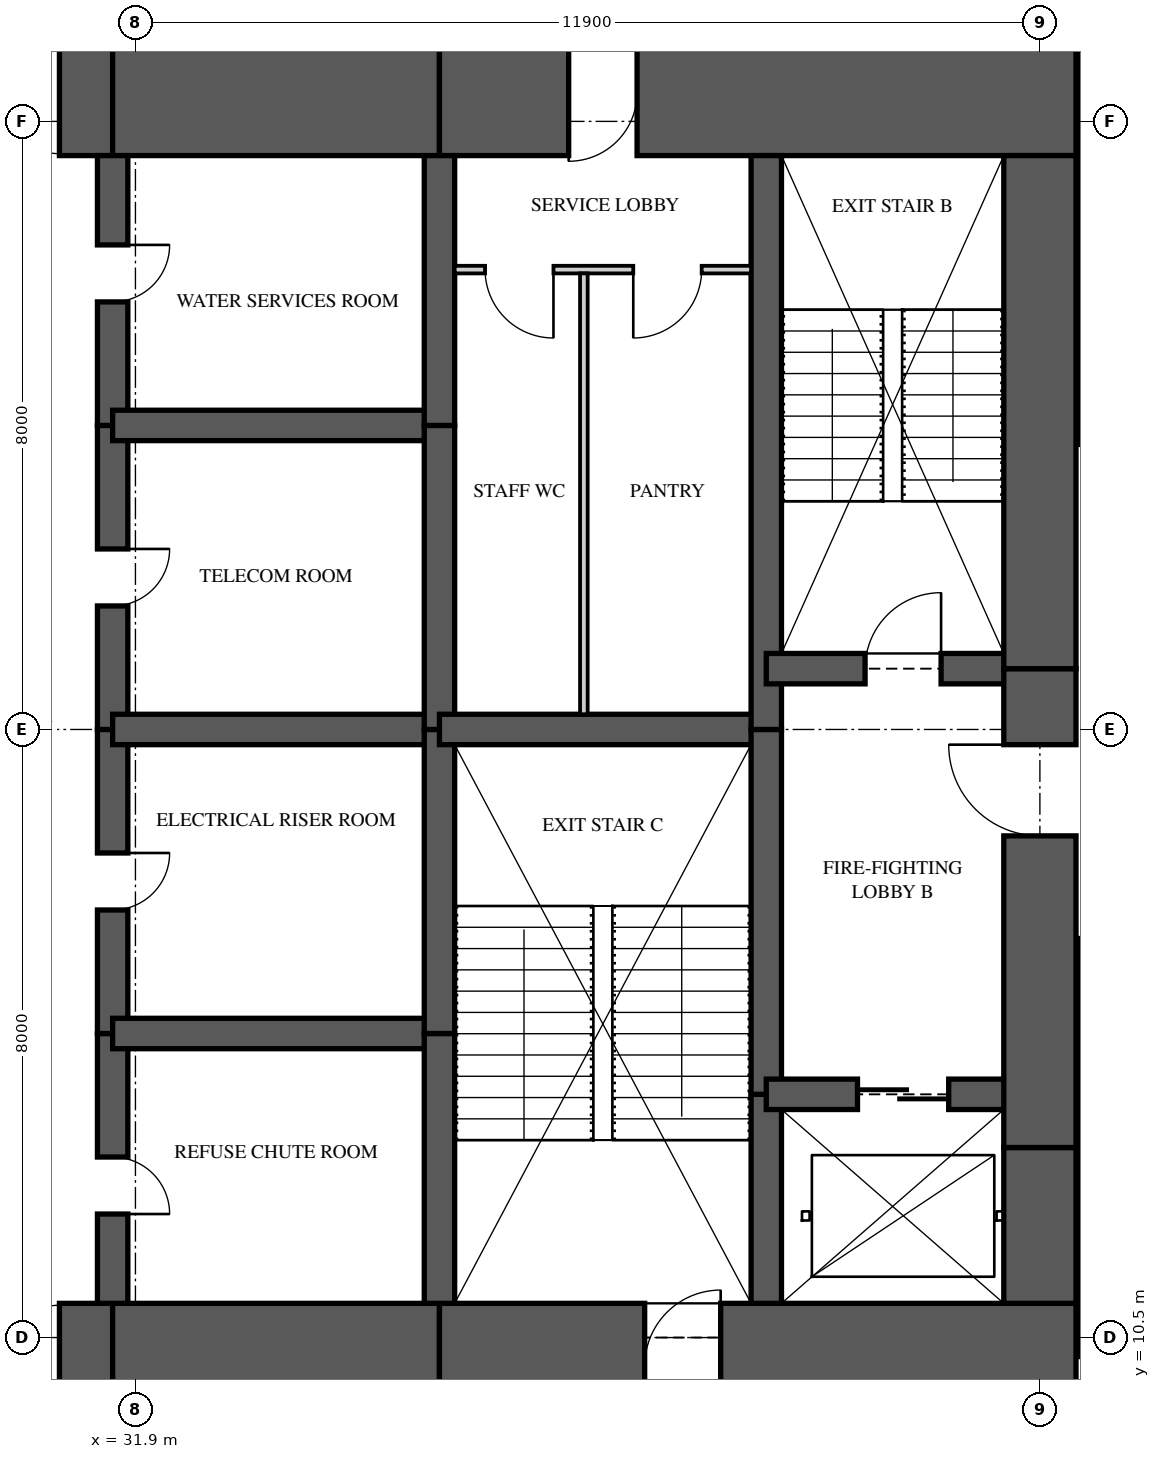
"""IFC4 building model, lengths in metres.
Left out: names, types, materials, properties, quantities, classifications, styles, units other than length and angle.
Written with IfcOpenShell. Run it as: python <this file> out.ifc"""

import sys

from ifc_helpers import new_model, si_unit, direction, frame, frame_2d, origin, place, context, subcontext, project, spatial, rectangle, extrude, element, fill, save


model = new_model("IFC4")
c1 = context("Model", 3, precision=1e-05, world=origin(), true_north=direction((0.0, 1.0)))
c2 = subcontext(c1, "Body", "Model", "MODEL_VIEW")
j1 = project(units=[si_unit("LENGTHUNIT", "METRE"), si_unit("PLANEANGLEUNIT", "RADIAN")], contexts=[c1])
p1 = place(None, origin())
s1 = spatial("IfcSite", under=j1, at=p1, CompositionType="ELEMENT")
p2 = place(p1, origin())
s2 = spatial("IfcBuilding", under=s1, at=p2, CompositionType="ELEMENT")
p3 = place(p2, frame((0.0, 0.0, 64.55)))
s3 = spatial("IfcBuildingStorey", under=s2, at=p3, CompositionType="ELEMENT", Elevation=64.55)
p4 = place(p3, frame((26.0, 10.125, 0.0), z_axis=(0.0, 0.0, 1.0), x_axis=(1.0, 0.0, 0.0)))
e1 = element("IfcWall", 1, at=p4, inside=s3, PredefinedType="SHEAR", context=c2, shape_type="SweptSolid", body=[
    extrude(rectangle(XDim=5.6, YDim=1.65, at=frame_2d((2.8, 0.0))), origin(), (0.0, 0.0, 1.0), 3.35),
])
p5 = place(p4, frame((3.3, 0.0, 0.0)))
e2 = element("IfcOpeningElement", 2, at=p5, cuts=e1, PredefinedType="OPENING", context=c2, shape_type="SweptSolid", body=[
    extrude(rectangle(XDim=1.6, YDim=2.1, at=frame_2d((0.8, 1.05))), frame((0.0, 0.835, 0.0), z_axis=(0.0, -1.0, 0.0), x_axis=(1.0, 0.0, 0.0)), (0.0, 0.0, 1.0), 1.67),
])
p6 = place(p3, frame((31.6, 10.125, 0.0), z_axis=(0.0, 0.0, 1.0), x_axis=(1.0, 0.0, 0.0)))
e3 = element("IfcWall", 3, at=p6, inside=s3, PredefinedType="SHEAR", context=c2, shape_type="SweptSolid", body=[
    extrude(rectangle(XDim=4.3, YDim=1.65, at=frame_2d((2.15, 0.0))), origin(), (0.0, 0.0, 1.0), 3.35),
])
p7 = place(p3, frame((35.9, 10.125, 0.0), z_axis=(0.0, 0.0, 1.0), x_axis=(1.0, 0.0, 0.0)))
e4 = element("IfcWall", 4, at=p7, inside=s3, PredefinedType="SHEAR", context=c2, shape_type="SweptSolid", body=[
    extrude(rectangle(XDim=8.375, YDim=1.65, at=frame_2d((4.188, 0.0))), origin(), (0.0, 0.0, 1.0), 3.35),
])
p8 = place(p7, frame((2.7, 0.0, 0.0)))
e5 = element("IfcOpeningElement", 5, at=p8, cuts=e4, PredefinedType="OPENING", context=c2, shape_type="SweptSolid", body=[
    extrude(rectangle(XDim=1.0, YDim=2.1, at=frame_2d((0.5, 1.05))), frame((0.0, 0.835, 0.0), z_axis=(0.0, -1.0, 0.0), x_axis=(1.0, 0.0, 0.0)), (0.0, 0.0, 1.0), 1.67),
])
p9 = place(p3, frame((44.275, 26.875, 0.0), z_axis=(0.0, 0.0, 1.0), x_axis=(-1.0, 0.0, 0.0)))
e6 = element("IfcWall", 6, at=p9, inside=s3, PredefinedType="SHEAR", context=c2, shape_type="SweptSolid", body=[
    extrude(rectangle(XDim=8.375, YDim=1.65, at=frame_2d((4.188, 0.0))), origin(), (0.0, 0.0, 1.0), 3.35),
])
p10 = place(p9, frame((5.775, 0.0, 0.0)))
e7 = element("IfcOpeningElement", 7, at=p10, cuts=e6, PredefinedType="OPENING", context=c2, shape_type="SweptSolid", body=[
    extrude(rectangle(XDim=0.9, YDim=2.1, at=frame_2d((0.45, 1.05))), frame((0.0, 0.835, 0.0), z_axis=(0.0, -1.0, 0.0), x_axis=(1.0, 0.0, 0.0)), (0.0, 0.0, 1.0), 1.67),
])
p11 = place(p3, frame((35.9, 26.875, 0.0), z_axis=(0.0, 0.0, 1.0), x_axis=(-1.0, 0.0, 0.0)))
e8 = element("IfcWall", 8, at=p11, inside=s3, PredefinedType="SHEAR", context=c2, shape_type="SweptSolid", body=[
    extrude(rectangle(XDim=4.3, YDim=1.65, at=frame_2d((2.15, 0.0))), origin(), (0.0, 0.0, 1.0), 3.35),
])
p12 = place(p3, frame((31.6, 26.875, 0.0), z_axis=(0.0, 0.0, 1.0), x_axis=(-1.0, 0.0, 0.0)))
e9 = element("IfcWall", 9, at=p12, inside=s3, PredefinedType="SHEAR", context=c2, shape_type="SweptSolid", body=[
    extrude(rectangle(XDim=5.6, YDim=1.65, at=frame_2d((2.8, 0.0))), origin(), (0.0, 0.0, 1.0), 3.35),
])
p13 = place(p12, frame((0.7, 0.0, 0.0)))
e10 = element("IfcOpeningElement", 10, at=p13, cuts=e9, PredefinedType="OPENING", context=c2, shape_type="SweptSolid", body=[
    extrude(rectangle(XDim=1.6, YDim=2.1, at=frame_2d((0.8, 1.05))), frame((0.0, 0.835, 0.0), z_axis=(0.0, -1.0, 0.0), x_axis=(1.0, 0.0, 0.0)), (0.0, 0.0, 1.0), 1.67),
])
p14 = place(p3, frame((43.8, 10.95, 0.0), z_axis=(0.0, 0.0, 1.0), x_axis=(0.0, 1.0, 0.0)))
e11 = element("IfcWall", 11, at=p14, inside=s3, PredefinedType="SHEAR", context=c2, shape_type="SweptSolid", body=[
    extrude(rectangle(XDim=2.05, YDim=0.95, at=frame_2d((1.025, 0.0))), origin(), (0.0, 0.0, 1.0), 3.35),
])
p15 = place(p3, frame((43.8, 13.0, 0.0), z_axis=(0.0, 0.0, 1.0), x_axis=(0.0, 1.0, 0.0)))
e12 = element("IfcWall", 12, at=p15, inside=s3, PredefinedType="SHEAR", context=c2, shape_type="SweptSolid", body=[
    extrude(rectangle(XDim=6.3, YDim=0.95, at=frame_2d((3.15, 0.0))), origin(), (0.0, 0.0, 1.0), 3.35),
])
p16 = place(p15, frame((4.1, 0.0, 0.0)))
e13 = element("IfcOpeningElement", 13, at=p16, cuts=e12, PredefinedType="OPENING", context=c2, shape_type="SweptSolid", body=[
    extrude(rectangle(XDim=1.2, YDim=2.2, at=frame_2d((0.6, 1.1))), frame((0.0, 0.485, 0.0), z_axis=(0.0, -1.0, 0.0), x_axis=(1.0, 0.0, 0.0)), (0.0, 0.0, 1.0), 0.97),
])
p17 = place(p3, frame((43.8, 19.3, 0.0), z_axis=(0.0, 0.0, 1.0), x_axis=(0.0, 1.0, 0.0)))
e14 = element("IfcWall", 14, at=p17, inside=s3, PredefinedType="SHEAR", context=c2, shape_type="SweptSolid", body=[
    extrude(rectangle(XDim=6.75, YDim=0.95, at=frame_2d((3.375, 0.0))), origin(), (0.0, 0.0, 1.0), 3.35),
])
p18 = place(p3, frame((31.6, 10.95, 0.0), z_axis=(0.0, 0.0, 1.0), x_axis=(0.0, 1.0, 0.0)))
e15 = element("IfcWall", 15, at=p18, inside=s3, PredefinedType="SHEAR", context=c2, shape_type="SweptSolid", body=[
    extrude(rectangle(XDim=3.55, YDim=0.4, at=frame_2d((1.775, 0.0))), origin(), (0.0, 0.0, 1.0), 3.35),
])
p19 = place(p18, frame((1.175, 0.0, 0.0)))
e16 = element("IfcOpeningElement", 16, at=p19, cuts=e15, PredefinedType="OPENING", context=c2, shape_type="SweptSolid", body=[
    extrude(rectangle(XDim=0.75, YDim=2.1, at=frame_2d((0.375, 1.05))), frame((0.0, 0.21, 0.0), z_axis=(0.0, -1.0, 0.0), x_axis=(1.0, 0.0, 0.0)), (0.0, 0.0, 1.0), 0.42),
])
p20 = place(p3, frame((31.6, 14.5, 0.0), z_axis=(0.0, 0.0, 1.0), x_axis=(0.0, 1.0, 0.0)))
e17 = element("IfcWall", 17, at=p20, inside=s3, PredefinedType="SHEAR", context=c2, shape_type="SweptSolid", body=[
    extrude(rectangle(XDim=4.0, YDim=0.4, at=frame_2d((2.0, 0.0))), origin(), (0.0, 0.0, 1.0), 3.35),
])
p21 = place(p20, frame((1.625, 0.0, 0.0)))
e18 = element("IfcOpeningElement", 18, at=p21, cuts=e17, PredefinedType="OPENING", context=c2, shape_type="SweptSolid", body=[
    extrude(rectangle(XDim=0.75, YDim=2.1, at=frame_2d((0.375, 1.05))), frame((0.0, 0.21, 0.0), z_axis=(0.0, -1.0, 0.0), x_axis=(1.0, 0.0, 0.0)), (0.0, 0.0, 1.0), 0.42),
])
p22 = place(p3, frame((31.6, 18.5, 0.0), z_axis=(0.0, 0.0, 1.0), x_axis=(0.0, 1.0, 0.0)))
e19 = element("IfcWall", 19, at=p22, inside=s3, PredefinedType="SHEAR", context=c2, shape_type="SweptSolid", body=[
    extrude(rectangle(XDim=4.0, YDim=0.4, at=frame_2d((2.0, 0.0))), origin(), (0.0, 0.0, 1.0), 3.35),
])
p23 = place(p22, frame((1.625, 0.0, 0.0)))
e20 = element("IfcOpeningElement", 20, at=p23, cuts=e19, PredefinedType="OPENING", context=c2, shape_type="SweptSolid", body=[
    extrude(rectangle(XDim=0.75, YDim=2.1, at=frame_2d((0.375, 1.05))), frame((0.0, 0.21, 0.0), z_axis=(0.0, -1.0, 0.0), x_axis=(1.0, 0.0, 0.0)), (0.0, 0.0, 1.0), 0.42),
])
p24 = place(p3, frame((31.6, 22.5, 0.0), z_axis=(0.0, 0.0, 1.0), x_axis=(0.0, 1.0, 0.0)))
e21 = element("IfcWall", 21, at=p24, inside=s3, PredefinedType="SHEAR", context=c2, shape_type="SweptSolid", body=[
    extrude(rectangle(XDim=3.55, YDim=0.4, at=frame_2d((1.775, 0.0))), origin(), (0.0, 0.0, 1.0), 3.35),
])
p25 = place(p24, frame((1.625, 0.0, 0.0)))
e22 = element("IfcOpeningElement", 22, at=p25, cuts=e21, PredefinedType="OPENING", context=c2, shape_type="SweptSolid", body=[
    extrude(rectangle(XDim=0.75, YDim=2.1, at=frame_2d((0.375, 1.05))), frame((0.0, 0.21, 0.0), z_axis=(0.0, -1.0, 0.0), x_axis=(1.0, 0.0, 0.0)), (0.0, 0.0, 1.0), 0.42),
])
p26 = place(p3, frame((35.9, 10.95, 0.0), z_axis=(0.0, 0.0, 1.0), x_axis=(0.0, 1.0, 0.0)))
e23 = element("IfcWall", 23, at=p26, inside=s3, PredefinedType="SHEAR", context=c2, shape_type="SweptSolid", body=[
    extrude(rectangle(XDim=3.55, YDim=0.4, at=frame_2d((1.775, 0.0))), origin(), (0.0, 0.0, 1.0), 3.35),
])
for number, where, z_axis, x_axis in (
    (24, (35.9, 14.5, 0.0), (0.0, 0.0, 1.0), (0.0, 1.0, 0.0)),
    (25, (35.9, 18.5, 0.0), (0.0, 0.0, 1.0), (0.0, 1.0, 0.0)),
):
    element("IfcWall", number, at=place(p3, frame(where, z_axis=z_axis, x_axis=x_axis)), inside=s3, PredefinedType="SHEAR", context=c2, shape_type="SweptSolid", body=[
        extrude(rectangle(XDim=4.0, YDim=0.4, at=frame_2d((2.0, 0.0))), origin(), (0.0, 0.0, 1.0), 3.35),
    ])
p27 = place(p3, frame((35.9, 22.5, 0.0), z_axis=(0.0, 0.0, 1.0), x_axis=(0.0, 1.0, 0.0)))
e26 = element("IfcWall", 26, at=p27, inside=s3, PredefinedType="SHEAR", context=c2, shape_type="SweptSolid", body=[
    extrude(rectangle(XDim=3.55, YDim=0.4, at=frame_2d((1.775, 0.0))), origin(), (0.0, 0.0, 1.0), 3.35),
])
p28 = place(p3, frame((40.2, 10.95, 0.0), z_axis=(0.0, 0.0, 1.0), x_axis=(0.0, 1.0, 0.0)))
e27 = element("IfcWall", 27, at=p28, inside=s3, PredefinedType="SHEAR", context=c2, shape_type="SweptSolid", body=[
    extrude(rectangle(XDim=2.75, YDim=0.4, at=frame_2d((1.375, 0.0))), origin(), (0.0, 0.0, 1.0), 3.35),
])
p29 = place(p3, frame((40.2, 13.7, 0.0), z_axis=(0.0, 0.0, 1.0), x_axis=(0.0, 1.0, 0.0)))
e28 = element("IfcWall", 28, at=p29, inside=s3, PredefinedType="SHEAR", context=c2, shape_type="SweptSolid", body=[
    extrude(rectangle(XDim=4.8, YDim=0.4, at=frame_2d((2.4, 0.0))), origin(), (0.0, 0.0, 1.0), 3.35),
])
p30 = place(p3, frame((40.2, 18.5, 0.0), z_axis=(0.0, 0.0, 1.0), x_axis=(0.0, 1.0, 0.0)))
e29 = element("IfcWall", 29, at=p30, inside=s3, PredefinedType="SHEAR", context=c2, shape_type="SweptSolid", body=[
    extrude(rectangle(XDim=7.55, YDim=0.4, at=frame_2d((3.775, 0.0))), origin(), (0.0, 0.0, 1.0), 3.35),
])
for number, where, z_axis, x_axis in (
    (30, (31.6, 14.5, 0.0), (0.0, 0.0, 1.0), (1.0, 0.0, 0.0)),
    (31, (31.6, 18.5, 0.0), (0.0, 0.0, 1.0), (1.0, 0.0, 0.0)),
    (32, (31.6, 22.5, 0.0), (0.0, 0.0, 1.0), (1.0, 0.0, 0.0)),
):
    element("IfcWall", number, at=place(p3, frame(where, z_axis=z_axis, x_axis=x_axis)), inside=s3, PredefinedType="SHEAR", context=c2, shape_type="SweptSolid", body=[
        extrude(rectangle(XDim=4.3, YDim=0.4, at=frame_2d((2.15, 0.0))), origin(), (0.0, 0.0, 1.0), 3.35),
    ])
p31 = place(p3, frame((35.9, 18.5, 0.0), z_axis=(0.0, 0.0, 1.0), x_axis=(1.0, 0.0, 0.0)))
e33 = element("IfcWall", 33, at=p31, inside=s3, PredefinedType="SHEAR", context=c2, shape_type="SweptSolid", body=[
    extrude(rectangle(XDim=4.3, YDim=0.4, at=frame_2d((2.15, 0.0))), origin(), (0.0, 0.0, 1.0), 3.35),
])
p32 = place(p3, frame((40.2, 13.7, 0.0), z_axis=(0.0, 0.0, 1.0), x_axis=(1.0, 0.0, 0.0)))
e34 = element("IfcWall", 34, at=p32, inside=s3, PredefinedType="SHEAR", context=c2, shape_type="SweptSolid", body=[
    extrude(rectangle(XDim=3.6, YDim=0.4, at=frame_2d((1.8, 0.0))), origin(), (0.0, 0.0, 1.0), 3.35),
])
p33 = place(p32, frame((1.2, 0.0, 0.0)))
e35 = element("IfcOpeningElement", 35, at=p33, cuts=e34, PredefinedType="OPENING", context=c2, shape_type="SweptSolid", body=[
    extrude(rectangle(XDim=1.2, YDim=2.1, at=frame_2d((0.6, 1.05))), frame((0.0, 0.21, 0.0), z_axis=(0.0, -1.0, 0.0), x_axis=(1.0, 0.0, 0.0)), (0.0, 0.0, 1.0), 0.42),
])
p34 = place(p3, frame((40.2, 19.3, 0.0), z_axis=(0.0, 0.0, 1.0), x_axis=(1.0, 0.0, 0.0)))
e36 = element("IfcWall", 36, at=p34, inside=s3, PredefinedType="SHEAR", context=c2, shape_type="SweptSolid", body=[
    extrude(rectangle(XDim=3.6, YDim=0.4, at=frame_2d((1.8, 0.0))), origin(), (0.0, 0.0, 1.0), 3.35),
])
p35 = place(p34, frame((1.3, 0.0, 0.0)))
e37 = element("IfcOpeningElement", 37, at=p35, cuts=e36, PredefinedType="OPENING", context=c2, shape_type="SweptSolid", body=[
    extrude(rectangle(XDim=1.0, YDim=2.1, at=frame_2d((0.5, 1.05))), frame((0.0, 0.21, 0.0), z_axis=(0.0, -1.0, 0.0), x_axis=(1.0, 0.0, 0.0)), (0.0, 0.0, 1.0), 0.42),
])
p36 = place(p3, frame((36.1, 24.55, 0.0), z_axis=(0.0, 0.0, 1.0), x_axis=(1.0, 0.0, 0.0)))
e38 = element("IfcWall", 38, at=p36, inside=s3, PredefinedType="PARTITIONING", context=c2, shape_type="SweptSolid", body=[
    extrude(rectangle(XDim=3.9, YDim=0.1, at=frame_2d((1.95, 0.0))), origin(), (0.0, 0.0, 1.0), 3.11),
])
p37 = place(p36, frame((0.4, 0.0, 0.0)))
e39 = element("IfcOpeningElement", 39, at=p37, cuts=e38, PredefinedType="OPENING", context=c2, shape_type="SweptSolid", body=[
    extrude(rectangle(XDim=0.9, YDim=2.1, at=frame_2d((0.45, 1.05))), frame((0.0, 0.06, 0.0), z_axis=(0.0, -1.0, 0.0), x_axis=(1.0, 0.0, 0.0)), (0.0, 0.0, 1.0), 0.12),
])
p38 = place(p36, frame((2.35, 0.0, 0.0)))
e40 = element("IfcOpeningElement", 40, at=p38, cuts=e38, PredefinedType="OPENING", context=c2, shape_type="SweptSolid", body=[
    extrude(rectangle(XDim=0.9, YDim=2.1, at=frame_2d((0.45, 1.05))), frame((0.0, 0.06, 0.0), z_axis=(0.0, -1.0, 0.0), x_axis=(1.0, 0.0, 0.0)), (0.0, 0.0, 1.0), 0.12),
])
p39 = place(p3, frame((37.8, 18.7, 0.0), z_axis=(0.0, 0.0, 1.0), x_axis=(0.0, 1.0, 0.0)))
e41 = element("IfcWall", 41, at=p39, inside=s3, PredefinedType="PARTITIONING", context=c2, shape_type="SweptSolid", body=[
    extrude(rectangle(XDim=5.8, YDim=0.1, at=frame_2d((2.9, 0.0))), origin(), (0.0, 0.0, 1.0), 3.11),
])
p40 = place(p37, frame((0.9, 0.0, 0.0), z_axis=(0.0, 0.0, 1.0), x_axis=(-1.0, 0.0, 0.0)))
e42 = element("IfcDoor", 42, at=p40, inside=s3, OperationType="SINGLE_SWING_LEFT", PredefinedType="DOOR", context=c2, shape_type="SweptSolid", body=[
    extrude(rectangle(XDim=0.9, YDim=2.1, at=frame_2d((0.45, 1.05))), frame((0.0, 0.025, 0.0), z_axis=(0.0, -1.0, 0.0), x_axis=(1.0, 0.0, 0.0)), (0.0, 0.0, 1.0), 0.05),
])
fill(e39, e42)
p41 = place(p38, frame((0.9, 0.0, 0.0), z_axis=(0.0, 0.0, 1.0), x_axis=(-1.0, 0.0, 0.0)))
e43 = element("IfcDoor", 43, at=p41, inside=s3, OperationType="SINGLE_SWING_RIGHT", PredefinedType="DOOR", context=c2, shape_type="SweptSolid", body=[
    extrude(rectangle(XDim=0.9, YDim=2.1, at=frame_2d((0.45, 1.05))), frame((0.0, 0.025, 0.0), z_axis=(0.0, -1.0, 0.0), x_axis=(1.0, 0.0, 0.0)), (0.0, 0.0, 1.0), 0.05),
])
fill(e40, e43)
p42 = place(p35, origin())
e44 = element("IfcDoor", 44, at=p42, inside=s3, OperationType="SINGLE_SWING_RIGHT", PredefinedType="DOOR", context=c2, shape_type="SweptSolid", body=[
    extrude(rectangle(XDim=1.0, YDim=2.1, at=frame_2d((0.5, 1.05))), frame((0.0, 0.025, 0.0), z_axis=(0.0, -1.0, 0.0), x_axis=(1.0, 0.0, 0.0)), (0.0, 0.0, 1.0), 0.05),
])
fill(e37, e44)
p43 = place(p16, origin())
e45 = element("IfcDoor", 45, at=p43, inside=s3, OperationType="SINGLE_SWING_RIGHT", PredefinedType="DOOR", context=c2, shape_type="SweptSolid", body=[
    extrude(rectangle(XDim=1.2, YDim=2.2, at=frame_2d((0.6, 1.1))), frame((0.0, 0.025, 0.0), z_axis=(0.0, -1.0, 0.0), x_axis=(1.0, 0.0, 0.0)), (0.0, 0.0, 1.0), 0.05),
])
fill(e13, e45)
p44 = place(p33, origin())
e46 = element("IfcDoor", 46, at=p44, inside=s3, OperationType="SLIDING_TO_LEFT", PredefinedType="DOOR", context=c2, shape_type="SweptSolid", body=[
    extrude(rectangle(XDim=1.2, YDim=2.1, at=frame_2d((0.6, 1.05))), frame((0.0, 0.025, 0.0), z_axis=(0.0, -1.0, 0.0), x_axis=(1.0, 0.0, 0.0)), (0.0, 0.0, 1.0), 0.05),
])
fill(e35, e46)
p45 = place(p5, origin())
e47 = element("IfcDoor", 47, at=p45, inside=s3, OperationType="DOUBLE_DOOR_SINGLE_SWING", PredefinedType="DOOR", context=c2, shape_type="SweptSolid", body=[
    extrude(rectangle(XDim=1.6, YDim=2.1, at=frame_2d((0.8, 1.05))), frame((0.0, 0.025, 0.0), z_axis=(0.0, -1.0, 0.0), x_axis=(1.0, 0.0, 0.0)), (0.0, 0.0, 1.0), 0.05),
])
fill(e2, e47)
p46 = place(p13, origin())
e48 = element("IfcDoor", 48, at=p46, inside=s3, OperationType="DOUBLE_DOOR_SINGLE_SWING", PredefinedType="DOOR", context=c2, shape_type="SweptSolid", body=[
    extrude(rectangle(XDim=1.6, YDim=2.1, at=frame_2d((0.8, 1.05))), frame((0.0, 0.025, 0.0), z_axis=(0.0, -1.0, 0.0), x_axis=(1.0, 0.0, 0.0)), (0.0, 0.0, 1.0), 0.05),
])
fill(e10, e48)
p47 = place(p19, frame((0.75, 0.0, 0.0), z_axis=(0.0, 0.0, 1.0), x_axis=(-1.0, 0.0, 0.0)))
e49 = element("IfcDoor", 49, at=p47, inside=s3, OperationType="SINGLE_SWING_RIGHT", PredefinedType="DOOR", context=c2, shape_type="SweptSolid", body=[
    extrude(rectangle(XDim=0.75, YDim=2.1, at=frame_2d((0.375, 1.05))), frame((0.0, 0.025, 0.0), z_axis=(0.0, -1.0, 0.0), x_axis=(1.0, 0.0, 0.0)), (0.0, 0.0, 1.0), 0.05),
])
fill(e16, e49)
p48 = place(p21, frame((0.75, 0.0, 0.0), z_axis=(0.0, 0.0, 1.0), x_axis=(-1.0, 0.0, 0.0)))
e50 = element("IfcDoor", 50, at=p48, inside=s3, OperationType="SINGLE_SWING_LEFT", PredefinedType="DOOR", context=c2, shape_type="SweptSolid", body=[
    extrude(rectangle(XDim=0.75, YDim=2.1, at=frame_2d((0.375, 1.05))), frame((0.0, 0.025, 0.0), z_axis=(0.0, -1.0, 0.0), x_axis=(1.0, 0.0, 0.0)), (0.0, 0.0, 1.0), 0.05),
])
fill(e18, e50)
p49 = place(p23, frame((0.75, 0.0, 0.0), z_axis=(0.0, 0.0, 1.0), x_axis=(-1.0, 0.0, 0.0)))
e51 = element("IfcDoor", 51, at=p49, inside=s3, OperationType="SINGLE_SWING_LEFT", PredefinedType="DOOR", context=c2, shape_type="SweptSolid", body=[
    extrude(rectangle(XDim=0.75, YDim=2.1, at=frame_2d((0.375, 1.05))), frame((0.0, 0.025, 0.0), z_axis=(0.0, -1.0, 0.0), x_axis=(1.0, 0.0, 0.0)), (0.0, 0.0, 1.0), 0.05),
])
fill(e20, e51)
p50 = place(p25, frame((0.75, 0.0, 0.0), z_axis=(0.0, 0.0, 1.0), x_axis=(-1.0, 0.0, 0.0)))
e52 = element("IfcDoor", 52, at=p50, inside=s3, OperationType="SINGLE_SWING_LEFT", PredefinedType="DOOR", context=c2, shape_type="SweptSolid", body=[
    extrude(rectangle(XDim=0.75, YDim=2.1, at=frame_2d((0.375, 1.05))), frame((0.0, 0.025, 0.0), z_axis=(0.0, -1.0, 0.0), x_axis=(1.0, 0.0, 0.0)), (0.0, 0.0, 1.0), 0.05),
])
fill(e22, e52)
p51 = place(p8, origin())
e53 = element("IfcDoor", 53, at=p51, inside=s3, OperationType="SINGLE_SWING_RIGHT", PredefinedType="DOOR", context=c2, shape_type="SweptSolid", body=[
    extrude(rectangle(XDim=1.0, YDim=2.1, at=frame_2d((0.5, 1.05))), frame((0.0, 0.025, 0.0), z_axis=(0.0, -1.0, 0.0), x_axis=(1.0, 0.0, 0.0)), (0.0, 0.0, 1.0), 0.05),
])
fill(e5, e53)
p52 = place(p10, origin())
e54 = element("IfcDoor", 54, at=p52, inside=s3, OperationType="SINGLE_SWING_RIGHT", PredefinedType="DOOR", context=c2, shape_type="SweptSolid", body=[
    extrude(rectangle(XDim=0.9, YDim=2.1, at=frame_2d((0.45, 1.05))), frame((0.0, 0.47, 0.0), z_axis=(0.0, -1.0, 0.0), x_axis=(1.0, 0.0, 0.0)), (0.0, 0.0, 1.0), 0.8),
])
fill(e7, e54)
save(model, sys.argv[1])
